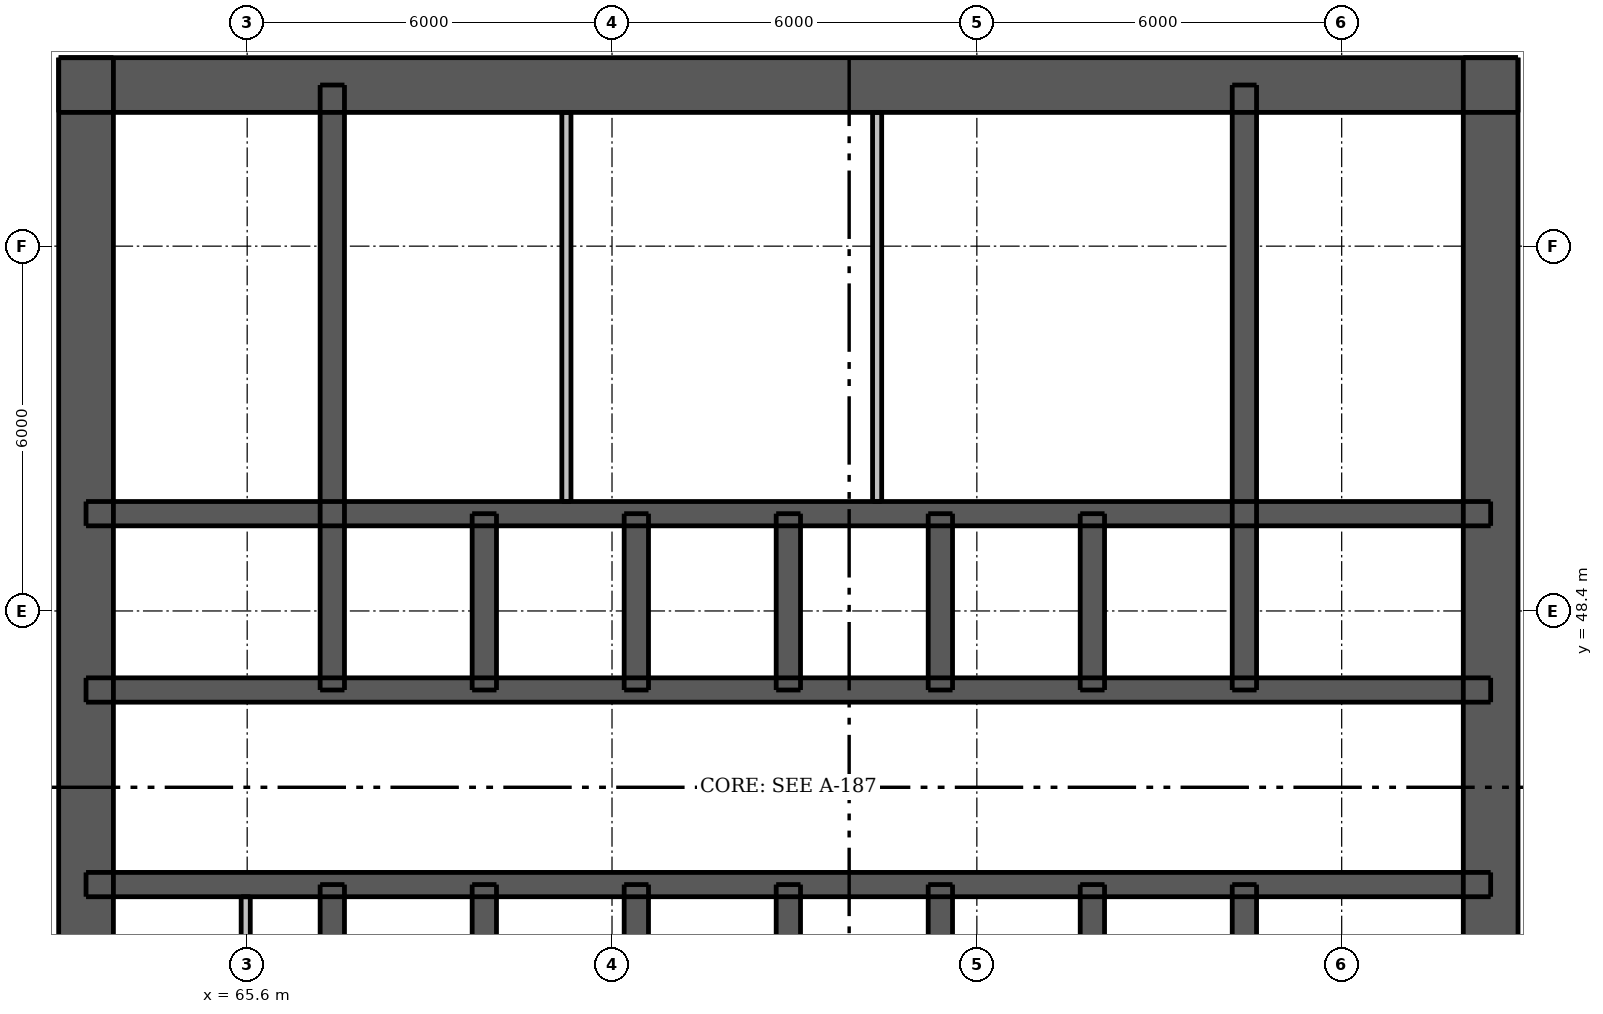
"""IFC4 building model, lengths in metres.
Left out: names, types, materials, properties, quantities, classifications, styles, units other than length and angle.
Written with IfcOpenShell. Run it as: python <this file> out.ifc"""

import sys

from ifc_helpers import new_model, si_unit, direction, frame, frame_2d, origin, place, context, subcontext, project, spatial, rectangle, extrude, element, fill, save


model = new_model("IFC4")
c1 = context("Model", 3, precision=1e-05, world=origin(), true_north=direction((0.0, 1.0)))
c2 = subcontext(c1, "Body", "Model", "MODEL_VIEW")
j1 = project(units=[si_unit("LENGTHUNIT", "METRE"), si_unit("PLANEANGLEUNIT", "RADIAN")], contexts=[c1])
p1 = place(None, origin())
s1 = spatial("IfcSite", under=j1, at=p1, CompositionType="ELEMENT")
p2 = place(p1, origin())
s2 = spatial("IfcBuilding", under=s1, at=p2, CompositionType="ELEMENT")
p3 = place(p2, frame((0.0, 0.0, 43.3)))
s3 = spatial("IfcBuildingStorey", under=s2, at=p3, CompositionType="ELEMENT", Elevation=43.3)
p4 = place(p3, frame((62.5, 57.05, 0.0), z_axis=(0.0, 0.0, 1.0), x_axis=(1.0, 0.0, 0.0)))
e1 = element("IfcWall", 1, at=p4, inside=s3, PredefinedType="SHEAR", context=c2, shape_type="SweptSolid", body=[
    extrude(rectangle(XDim=24.0, YDim=0.9, at=frame_2d((12.0, 0.0))), origin(), (0.0, 0.0, 1.0), 3.05),
])
p5 = place(p4, frame((20.85, 0.0, 0.0)))
e2 = element("IfcOpeningElement", 2, at=p5, cuts=e1, PredefinedType="OPENING", context=c2, shape_type="SweptSolid", body=[
    extrude(rectangle(XDim=1.1, YDim=2.1, at=frame_2d((0.55, 1.05))), frame((0.0, 0.46, 0.0), z_axis=(0.0, -1.0, 0.0), x_axis=(1.0, 0.0, 0.0)), (0.0, 0.0, 1.0), 0.92),
])
p6 = place(p4, frame((2.05, 0.0, 0.0)))
e3 = element("IfcOpeningElement", 3, at=p6, cuts=e1, PredefinedType="OPENING", context=c2, shape_type="SweptSolid", body=[
    extrude(rectangle(XDim=1.1, YDim=2.1, at=frame_2d((0.55, 1.05))), frame((0.0, 0.46, 0.0), z_axis=(0.0, -1.0, 0.0), x_axis=(1.0, 0.0, 0.0)), (0.0, 0.0, 1.0), 0.92),
])
p7 = place(p4, frame((6.075, 0.0, 0.0)))
e4 = element("IfcOpeningElement", 4, at=p7, cuts=e1, PredefinedType="OPENING", context=c2, shape_type="SweptSolid", body=[
    extrude(rectangle(XDim=0.9, YDim=2.1, at=frame_2d((0.45, 1.05))), frame((0.0, 0.46, 0.0), z_axis=(0.0, -1.0, 0.0), x_axis=(1.0, 0.0, 0.0)), (0.0, 0.0, 1.0), 0.92),
])
p8 = place(p4, frame((10.455, 0.0, 0.0)))
e5 = element("IfcOpeningElement", 5, at=p8, cuts=e1, PredefinedType="OPENING", context=c2, shape_type="SweptSolid", body=[
    extrude(rectangle(XDim=0.9, YDim=2.1, at=frame_2d((0.45, 1.05))), frame((0.0, 0.46, 0.0), z_axis=(0.0, -1.0, 0.0), x_axis=(1.0, 0.0, 0.0)), (0.0, 0.0, 1.0), 0.92),
])
p9 = place(p4, frame((15.93, 0.0, 0.0)))
e6 = element("IfcOpeningElement", 6, at=p9, cuts=e1, PredefinedType="OPENING", context=c2, shape_type="SweptSolid", body=[
    extrude(rectangle(XDim=0.9, YDim=2.1, at=frame_2d((0.45, 1.05))), frame((0.0, 0.46, 0.0), z_axis=(0.0, -1.0, 0.0), x_axis=(1.0, 0.0, 0.0)), (0.0, 0.0, 1.0), 0.92),
])
p10 = place(p3, frame((62.95, 33.5, 0.0), z_axis=(0.0, 0.0, 1.0), x_axis=(0.0, 1.0, 0.0)))
e7 = element("IfcWall", 7, at=p10, inside=s3, PredefinedType="SHEAR", context=c2, shape_type="SweptSolid", body=[
    extrude(rectangle(XDim=24.0, YDim=0.9, at=frame_2d((12.0, 0.0))), origin(), (0.0, 0.0, 1.0), 3.05),
])
p11 = place(p10, frame((11.2, 0.0, 0.0)))
e8 = element("IfcOpeningElement", 8, at=p11, cuts=e7, PredefinedType="OPENING", context=c2, shape_type="SweptSolid", body=[
    extrude(rectangle(XDim=1.6, YDim=2.1, at=frame_2d((0.8, 1.05))), frame((0.0, 0.46, 0.0), z_axis=(0.0, -1.0, 0.0), x_axis=(1.0, 0.0, 0.0)), (0.0, 0.0, 1.0), 0.92),
])
p12 = place(p3, frame((86.05, 33.5, 0.0), z_axis=(0.0, 0.0, 1.0), x_axis=(0.0, 1.0, 0.0)))
e9 = element("IfcWall", 9, at=p12, inside=s3, PredefinedType="SHEAR", context=c2, shape_type="SweptSolid", body=[
    extrude(rectangle(XDim=24.0, YDim=0.9, at=frame_2d((12.0, 0.0))), origin(), (0.0, 0.0, 1.0), 3.05),
])
p13 = place(p12, frame((11.2, 0.0, 0.0)))
e10 = element("IfcOpeningElement", 10, at=p13, cuts=e9, PredefinedType="OPENING", context=c2, shape_type="SweptSolid", body=[
    extrude(rectangle(XDim=1.6, YDim=2.1, at=frame_2d((0.8, 1.05))), frame((0.0, 0.46, 0.0), z_axis=(0.0, -1.0, 0.0), x_axis=(1.0, 0.0, 0.0)), (0.0, 0.0, 1.0), 0.92),
])
p14 = place(p3, frame((62.95, 43.9, 0.0), z_axis=(0.0, 0.0, 1.0), x_axis=(1.0, 0.0, 0.0)))
e11 = element("IfcWall", 11, at=p14, inside=s3, PredefinedType="SHEAR", context=c2, shape_type="SweptSolid", body=[
    extrude(rectangle(XDim=23.1, YDim=0.4, at=frame_2d((11.55, 0.0))), origin(), (0.0, 0.0, 1.0), 3.05),
])
p15 = place(p14, frame((1.088, 0.0, 0.0)))
e12 = element("IfcOpeningElement", 12, at=p15, cuts=e11, PredefinedType="OPENING", context=c2, shape_type="SweptSolid", body=[
    extrude(rectangle(XDim=0.9, YDim=2.1, at=frame_2d((0.45, 1.05))), frame((0.0, 0.21, 0.0), z_axis=(0.0, -1.0, 0.0), x_axis=(1.0, 0.0, 0.0)), (0.0, 0.0, 1.0), 0.42),
])
p16 = place(p14, frame((2.838, 0.0, 0.0)))
e13 = element("IfcOpeningElement", 13, at=p16, cuts=e11, PredefinedType="OPENING", context=c2, shape_type="SweptSolid", body=[
    extrude(rectangle(XDim=0.8, YDim=2.1, at=frame_2d((0.4, 1.05))), frame((0.0, 0.21, 0.0), z_axis=(0.0, -1.0, 0.0), x_axis=(1.0, 0.0, 0.0)), (0.0, 0.0, 1.0), 0.42),
])
p17 = place(p14, frame((20.5, 0.0, 0.0)))
e14 = element("IfcOpeningElement", 14, at=p17, cuts=e11, PredefinedType="OPENING", context=c2, shape_type="SweptSolid", body=[
    extrude(rectangle(XDim=0.9, YDim=2.1, at=frame_2d((0.45, 1.05))), frame((0.0, 0.21, 0.0), z_axis=(0.0, -1.0, 0.0), x_axis=(1.0, 0.0, 0.0)), (0.0, 0.0, 1.0), 0.42),
])
p18 = place(p14, frame((4.75, 0.0, 0.0)))
e15 = element("IfcOpeningElement", 15, at=p18, cuts=e11, PredefinedType="OPENING", context=c2, shape_type="SweptSolid", body=[
    extrude(rectangle(XDim=1.1, YDim=2.1, at=frame_2d((0.55, 1.05))), frame((0.0, 0.21, 0.0), z_axis=(0.0, -1.0, 0.0), x_axis=(1.0, 0.0, 0.0)), (0.0, 0.0, 1.0), 0.42),
])
p19 = place(p14, frame((7.25, 0.0, 0.0)))
e16 = element("IfcOpeningElement", 16, at=p19, cuts=e11, PredefinedType="OPENING", context=c2, shape_type="SweptSolid", body=[
    extrude(rectangle(XDim=1.1, YDim=2.1, at=frame_2d((0.55, 1.05))), frame((0.0, 0.21, 0.0), z_axis=(0.0, -1.0, 0.0), x_axis=(1.0, 0.0, 0.0)), (0.0, 0.0, 1.0), 0.42),
])
p20 = place(p14, frame((9.75, 0.0, 0.0)))
e17 = element("IfcOpeningElement", 17, at=p20, cuts=e11, PredefinedType="OPENING", context=c2, shape_type="SweptSolid", body=[
    extrude(rectangle(XDim=1.1, YDim=2.1, at=frame_2d((0.55, 1.05))), frame((0.0, 0.21, 0.0), z_axis=(0.0, -1.0, 0.0), x_axis=(1.0, 0.0, 0.0)), (0.0, 0.0, 1.0), 0.42),
])
p21 = place(p14, frame((12.25, 0.0, 0.0)))
e18 = element("IfcOpeningElement", 18, at=p21, cuts=e11, PredefinedType="OPENING", context=c2, shape_type="SweptSolid", body=[
    extrude(rectangle(XDim=1.1, YDim=2.1, at=frame_2d((0.55, 1.05))), frame((0.0, 0.21, 0.0), z_axis=(0.0, -1.0, 0.0), x_axis=(1.0, 0.0, 0.0)), (0.0, 0.0, 1.0), 0.42),
])
p22 = place(p14, frame((14.75, 0.0, 0.0)))
e19 = element("IfcOpeningElement", 19, at=p22, cuts=e11, PredefinedType="OPENING", context=c2, shape_type="SweptSolid", body=[
    extrude(rectangle(XDim=1.1, YDim=2.1, at=frame_2d((0.55, 1.05))), frame((0.0, 0.21, 0.0), z_axis=(0.0, -1.0, 0.0), x_axis=(1.0, 0.0, 0.0)), (0.0, 0.0, 1.0), 0.42),
])
p23 = place(p14, frame((17.25, 0.0, 0.0)))
e20 = element("IfcOpeningElement", 20, at=p23, cuts=e11, PredefinedType="OPENING", context=c2, shape_type="SweptSolid", body=[
    extrude(rectangle(XDim=1.1, YDim=2.1, at=frame_2d((0.55, 1.05))), frame((0.0, 0.21, 0.0), z_axis=(0.0, -1.0, 0.0), x_axis=(1.0, 0.0, 0.0)), (0.0, 0.0, 1.0), 0.42),
])
p24 = place(p3, frame((62.95, 47.1, 0.0), z_axis=(0.0, 0.0, 1.0), x_axis=(1.0, 0.0, 0.0)))
e21 = element("IfcWall", 21, at=p24, inside=s3, PredefinedType="SHEAR", context=c2, shape_type="SweptSolid", body=[
    extrude(rectangle(XDim=23.1, YDim=0.4, at=frame_2d((11.55, 0.0))), origin(), (0.0, 0.0, 1.0), 3.05),
])
p25 = place(p24, frame((1.7, 0.0, 0.0)))
e22 = element("IfcOpeningElement", 22, at=p25, cuts=e21, PredefinedType="OPENING", context=c2, shape_type="SweptSolid", body=[
    extrude(rectangle(XDim=0.9, YDim=2.1, at=frame_2d((0.45, 1.05))), frame((0.0, 0.21, 0.0), z_axis=(0.0, -1.0, 0.0), x_axis=(1.0, 0.0, 0.0)), (0.0, 0.0, 1.0), 0.42),
])
p26 = place(p24, frame((20.5, 0.0, 0.0)))
e23 = element("IfcOpeningElement", 23, at=p26, cuts=e21, PredefinedType="OPENING", context=c2, shape_type="SweptSolid", body=[
    extrude(rectangle(XDim=0.9, YDim=2.1, at=frame_2d((0.45, 1.05))), frame((0.0, 0.21, 0.0), z_axis=(0.0, -1.0, 0.0), x_axis=(1.0, 0.0, 0.0)), (0.0, 0.0, 1.0), 0.42),
])
p27 = place(p3, frame((62.95, 50.0, 0.0), z_axis=(0.0, 0.0, 1.0), x_axis=(1.0, 0.0, 0.0)))
e24 = element("IfcWall", 24, at=p27, inside=s3, PredefinedType="SHEAR", context=c2, shape_type="SweptSolid", body=[
    extrude(rectangle(XDim=23.1, YDim=0.4, at=frame_2d((11.55, 0.0))), origin(), (0.0, 0.0, 1.0), 3.05),
])
p28 = place(p3, frame((67.0, 33.95, 0.0), z_axis=(0.0, 0.0, 1.0), x_axis=(0.0, 1.0, 0.0)))
e25 = element("IfcWall", 25, at=p28, inside=s3, PredefinedType="SHEAR", context=c2, shape_type="SweptSolid", body=[
    extrude(rectangle(XDim=9.95, YDim=0.4, at=frame_2d((4.975, 0.0))), origin(), (0.0, 0.0, 1.0), 3.05),
])
p29 = place(p28, frame((0.65, 0.0, 0.0)))
e26 = element("IfcOpeningElement", 26, at=p29, cuts=e25, PredefinedType="OPENING", context=c2, shape_type="SweptSolid", body=[
    extrude(rectangle(XDim=1.1, YDim=2.1, at=frame_2d((0.55, 1.05))), frame((0.0, 0.21, 0.0), z_axis=(0.0, -1.0, 0.0), x_axis=(1.0, 0.0, 0.0)), (0.0, 0.0, 1.0), 0.42),
])
for number, where, z_axis, x_axis in (
    (27, (67.0, 47.1, 0.0), (0.0, 0.0, 1.0), (0.0, 1.0, 0.0)),
    (28, (82.0, 33.95, 0.0), (0.0, 0.0, 1.0), (0.0, 1.0, 0.0)),
    (29, (82.0, 47.1, 0.0), (0.0, 0.0, 1.0), (0.0, 1.0, 0.0)),
):
    element("IfcWall", number, at=place(p3, frame(where, z_axis=z_axis, x_axis=x_axis)), inside=s3, PredefinedType="SHEAR", context=c2, shape_type="SweptSolid", body=[
        extrude(rectangle(XDim=9.95, YDim=0.4, at=frame_2d((4.975, 0.0))), origin(), (0.0, 0.0, 1.0), 3.05),
    ])
for number, where, z_axis, x_axis in (
    (30, (69.5, 41.0, 0.0), (0.0, 0.0, 1.0), (0.0, 1.0, 0.0)),
    (31, (69.5, 47.1, 0.0), (0.0, 0.0, 1.0), (0.0, 1.0, 0.0)),
    (32, (72.0, 41.0, 0.0), (0.0, 0.0, 1.0), (0.0, 1.0, 0.0)),
    (33, (72.0, 47.1, 0.0), (0.0, 0.0, 1.0), (0.0, 1.0, 0.0)),
    (34, (74.5, 41.0, 0.0), (0.0, 0.0, 1.0), (0.0, 1.0, 0.0)),
    (35, (74.5, 47.1, 0.0), (0.0, 0.0, 1.0), (0.0, 1.0, 0.0)),
    (36, (77.0, 41.0, 0.0), (0.0, 0.0, 1.0), (0.0, 1.0, 0.0)),
    (37, (77.0, 47.1, 0.0), (0.0, 0.0, 1.0), (0.0, 1.0, 0.0)),
    (38, (79.5, 41.0, 0.0), (0.0, 0.0, 1.0), (0.0, 1.0, 0.0)),
    (39, (79.5, 47.1, 0.0), (0.0, 0.0, 1.0), (0.0, 1.0, 0.0)),
):
    element("IfcWall", number, at=place(p3, frame(where, z_axis=z_axis, x_axis=x_axis)), inside=s3, PredefinedType="SHEAR", context=c2, shape_type="SweptSolid", body=[
        extrude(rectangle(XDim=2.9, YDim=0.4, at=frame_2d((1.45, 0.0))), origin(), (0.0, 0.0, 1.0), 3.05),
    ])
p30 = place(p3, frame((65.576, 41.2, 0.0), z_axis=(0.0, 0.0, 1.0), x_axis=(0.0, 1.0, 0.0)))
e40 = element("IfcWall", 40, at=p30, inside=s3, PredefinedType="PLUMBINGWALL", context=c2, shape_type="SweptSolid", body=[
    extrude(rectangle(XDim=2.5, YDim=0.15, at=frame_2d((1.25, 0.0))), origin(), (0.0, 0.0, 1.0), 3.05),
])
for number, where, z_axis, x_axis in (
    (41, (70.85, 50.2, 0.0), (0.0, 0.0, 1.0), (0.0, 1.0, 0.0)),
    (42, (75.96, 50.2, 0.0), (0.0, 0.0, 1.0), (0.0, 1.0, 0.0)),
):
    element("IfcWall", number, at=place(p3, frame(where, z_axis=z_axis, x_axis=x_axis)), inside=s3, PredefinedType="PLUMBINGWALL", context=c2, shape_type="SweptSolid", body=[
        extrude(rectangle(XDim=6.4, YDim=0.15, at=frame_2d((3.2, 0.0))), origin(), (0.0, 0.0, 1.0), 3.05),
    ])
p31 = place(p5, origin())
e43 = element("IfcDoor", 43, at=p31, inside=s3, OperationType="SINGLE_SWING_RIGHT", PredefinedType="DOOR", context=c2, shape_type="SweptSolid", body=[
    extrude(rectangle(XDim=1.1, YDim=2.1, at=frame_2d((0.55, 1.05))), frame((0.0, -0.388, 0.0), z_axis=(0.0, -1.0, 0.0), x_axis=(1.0, 0.0, 0.0)), (0.0, 0.0, 1.0), 0.05),
])
fill(e2, e43)
p32 = place(p6, origin())
e44 = element("IfcDoor", 44, at=p32, inside=s3, OperationType="SINGLE_SWING_LEFT", PredefinedType="DOOR", context=c2, shape_type="SweptSolid", body=[
    extrude(rectangle(XDim=1.1, YDim=2.1, at=frame_2d((0.55, 1.05))), frame((0.0, -0.388, 0.0), z_axis=(0.0, -1.0, 0.0), x_axis=(1.0, 0.0, 0.0)), (0.0, 0.0, 1.0), 0.05),
])
fill(e3, e44)
p33 = place(p11, origin())
e45 = element("IfcDoor", 45, at=p33, inside=s3, OperationType="DOUBLE_DOOR_SINGLE_SWING", PredefinedType="DOOR", context=c2, shape_type="SweptSolid", body=[
    extrude(rectangle(XDim=1.6, YDim=2.1, at=frame_2d((0.8, 1.05))), frame((0.0, -0.388, 0.0), z_axis=(0.0, -1.0, 0.0), x_axis=(1.0, 0.0, 0.0)), (0.0, 0.0, 1.0), 0.05),
])
fill(e8, e45)
p34 = place(p13, origin())
e46 = element("IfcDoor", 46, at=p34, inside=s3, OperationType="DOUBLE_DOOR_SINGLE_SWING", PredefinedType="DOOR", context=c2, shape_type="SweptSolid", body=[
    extrude(rectangle(XDim=1.6, YDim=2.1, at=frame_2d((0.8, 1.05))), frame((0.0, 0.438, 0.0), z_axis=(0.0, -1.0, 0.0), x_axis=(1.0, 0.0, 0.0)), (0.0, 0.0, 1.0), 0.05),
])
fill(e10, e46)
p35 = place(p15, origin())
e47 = element("IfcDoor", 47, at=p35, inside=s3, OperationType="SINGLE_SWING_LEFT", PredefinedType="DOOR", context=c2, shape_type="SweptSolid", body=[
    extrude(rectangle(XDim=0.9, YDim=2.1, at=frame_2d((0.45, 1.05))), frame((0.0, -0.138, 0.0), z_axis=(0.0, -1.0, 0.0), x_axis=(1.0, 0.0, 0.0)), (0.0, 0.0, 1.0), 0.05),
])
fill(e12, e47)
p36 = place(p16, origin())
e48 = element("IfcDoor", 48, at=p36, inside=s3, OperationType="SINGLE_SWING_RIGHT", PredefinedType="DOOR", context=c2, shape_type="SweptSolid", body=[
    extrude(rectangle(XDim=0.8, YDim=2.1, at=frame_2d((0.4, 1.05))), frame((0.0, -0.138, 0.0), z_axis=(0.0, -1.0, 0.0), x_axis=(1.0, 0.0, 0.0)), (0.0, 0.0, 1.0), 0.05),
])
fill(e13, e48)
p37 = place(p17, origin())
e49 = element("IfcDoor", 49, at=p37, inside=s3, OperationType="SINGLE_SWING_LEFT", PredefinedType="DOOR", context=c2, shape_type="SweptSolid", body=[
    extrude(rectangle(XDim=0.9, YDim=2.1, at=frame_2d((0.45, 1.05))), frame((0.0, -0.138, 0.0), z_axis=(0.0, -1.0, 0.0), x_axis=(1.0, 0.0, 0.0)), (0.0, 0.0, 1.0), 0.05),
])
fill(e14, e49)
p38 = place(p25, origin())
e50 = element("IfcDoor", 50, at=p38, inside=s3, OperationType="SINGLE_SWING_LEFT", PredefinedType="DOOR", context=c2, shape_type="SweptSolid", body=[
    extrude(rectangle(XDim=0.9, YDim=2.1, at=frame_2d((0.45, 1.05))), frame((0.0, 0.188, 0.0), z_axis=(0.0, -1.0, 0.0), x_axis=(1.0, 0.0, 0.0)), (0.0, 0.0, 1.0), 0.05),
])
fill(e22, e50)
p39 = place(p26, origin())
e51 = element("IfcDoor", 51, at=p39, inside=s3, OperationType="SINGLE_SWING_LEFT", PredefinedType="DOOR", context=c2, shape_type="SweptSolid", body=[
    extrude(rectangle(XDim=0.9, YDim=2.1, at=frame_2d((0.45, 1.05))), frame((0.0, 0.188, 0.0), z_axis=(0.0, -1.0, 0.0), x_axis=(1.0, 0.0, 0.0)), (0.0, 0.0, 1.0), 0.05),
])
fill(e23, e51)
p40 = place(p7, origin())
e52 = element("IfcDoor", 52, at=p40, inside=s3, OperationType="SINGLE_SWING_RIGHT", PredefinedType="DOOR", context=c2, shape_type="SweptSolid", body=[
    extrude(rectangle(XDim=0.9, YDim=2.1, at=frame_2d((0.45, 1.05))), frame((0.0, -0.388, 0.0), z_axis=(0.0, -1.0, 0.0), x_axis=(1.0, 0.0, 0.0)), (0.0, 0.0, 1.0), 0.05),
])
fill(e4, e52)
p41 = place(p8, origin())
e53 = element("IfcDoor", 53, at=p41, inside=s3, OperationType="SINGLE_SWING_RIGHT", PredefinedType="DOOR", context=c2, shape_type="SweptSolid", body=[
    extrude(rectangle(XDim=0.9, YDim=2.1, at=frame_2d((0.45, 1.05))), frame((0.0, -0.388, 0.0), z_axis=(0.0, -1.0, 0.0), x_axis=(1.0, 0.0, 0.0)), (0.0, 0.0, 1.0), 0.05),
])
fill(e5, e53)
p42 = place(p9, origin())
e54 = element("IfcDoor", 54, at=p42, inside=s3, OperationType="SINGLE_SWING_RIGHT", PredefinedType="DOOR", context=c2, shape_type="SweptSolid", body=[
    extrude(rectangle(XDim=0.9, YDim=2.1, at=frame_2d((0.45, 1.05))), frame((0.0, -0.388, 0.0), z_axis=(0.0, -1.0, 0.0), x_axis=(1.0, 0.0, 0.0)), (0.0, 0.0, 1.0), 0.05),
])
fill(e6, e54)
p43 = place(p18, origin())
e55 = element("IfcDoor", 55, at=p43, inside=s3, OperationType="DOUBLE_DOOR_SLIDING", PredefinedType="DOOR", context=c2, shape_type="SweptSolid", body=[
    extrude(rectangle(XDim=1.1, YDim=2.1, at=frame_2d((0.55, 1.05))), frame((0.0, 0.025, 0.0), z_axis=(0.0, -1.0, 0.0), x_axis=(1.0, 0.0, 0.0)), (0.0, 0.0, 1.0), 0.05),
])
fill(e15, e55)
p44 = place(p19, origin())
e56 = element("IfcDoor", 56, at=p44, inside=s3, OperationType="DOUBLE_DOOR_SLIDING", PredefinedType="DOOR", context=c2, shape_type="SweptSolid", body=[
    extrude(rectangle(XDim=1.1, YDim=2.1, at=frame_2d((0.55, 1.05))), frame((0.0, 0.025, 0.0), z_axis=(0.0, -1.0, 0.0), x_axis=(1.0, 0.0, 0.0)), (0.0, 0.0, 1.0), 0.05),
])
fill(e16, e56)
p45 = place(p20, origin())
e57 = element("IfcDoor", 57, at=p45, inside=s3, OperationType="DOUBLE_DOOR_SLIDING", PredefinedType="DOOR", context=c2, shape_type="SweptSolid", body=[
    extrude(rectangle(XDim=1.1, YDim=2.1, at=frame_2d((0.55, 1.05))), frame((0.0, 0.025, 0.0), z_axis=(0.0, -1.0, 0.0), x_axis=(1.0, 0.0, 0.0)), (0.0, 0.0, 1.0), 0.05),
])
fill(e17, e57)
p46 = place(p21, origin())
e58 = element("IfcDoor", 58, at=p46, inside=s3, OperationType="DOUBLE_DOOR_SLIDING", PredefinedType="DOOR", context=c2, shape_type="SweptSolid", body=[
    extrude(rectangle(XDim=1.1, YDim=2.1, at=frame_2d((0.55, 1.05))), frame((0.0, 0.025, 0.0), z_axis=(0.0, -1.0, 0.0), x_axis=(1.0, 0.0, 0.0)), (0.0, 0.0, 1.0), 0.05),
])
fill(e18, e58)
p47 = place(p22, origin())
e59 = element("IfcDoor", 59, at=p47, inside=s3, OperationType="DOUBLE_DOOR_SLIDING", PredefinedType="DOOR", context=c2, shape_type="SweptSolid", body=[
    extrude(rectangle(XDim=1.1, YDim=2.1, at=frame_2d((0.55, 1.05))), frame((0.0, 0.025, 0.0), z_axis=(0.0, -1.0, 0.0), x_axis=(1.0, 0.0, 0.0)), (0.0, 0.0, 1.0), 0.05),
])
fill(e19, e59)
p48 = place(p23, origin())
e60 = element("IfcDoor", 60, at=p48, inside=s3, OperationType="DOUBLE_DOOR_SLIDING", PredefinedType="DOOR", context=c2, shape_type="SweptSolid", body=[
    extrude(rectangle(XDim=1.1, YDim=2.1, at=frame_2d((0.55, 1.05))), frame((0.0, 0.025, 0.0), z_axis=(0.0, -1.0, 0.0), x_axis=(1.0, 0.0, 0.0)), (0.0, 0.0, 1.0), 0.05),
])
fill(e20, e60)
save(model, sys.argv[1])
